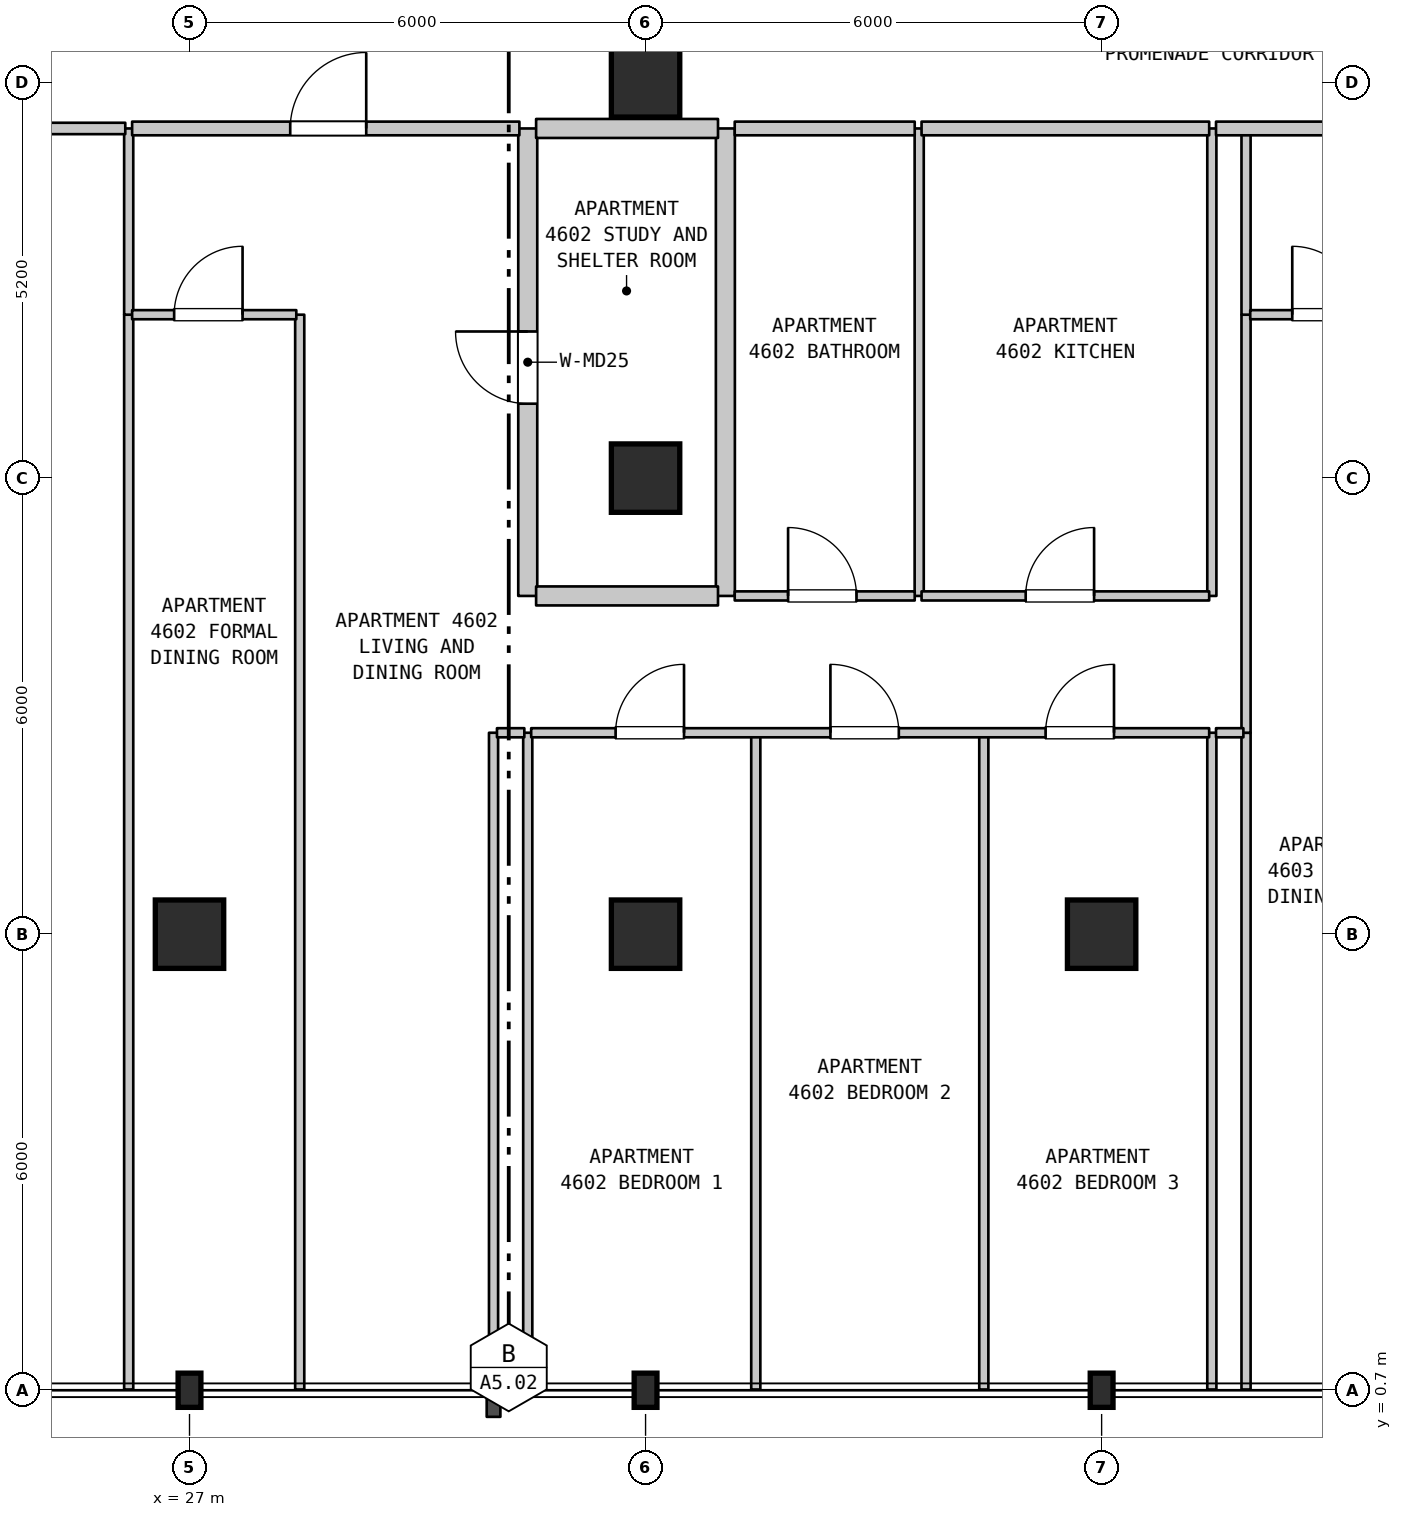
"""IFC4 building model, lengths in metres.
Left out: names, types, materials, properties, quantities, classifications, styles, units other than length and angle.
Written with IfcOpenShell. Run it as: python <this file> out.ifc"""

import sys

from ifc_helpers import new_model, si_unit, direction, frame, frame_2d, origin, origin_2d, place, context, subcontext, project, spatial, rectangle, i_section, extrude, element, fill, save


model = new_model("IFC4")
c1 = context("Model", 3, precision=1e-05, world=origin(), true_north=direction((0.0, 1.0)))
c2 = subcontext(c1, "Body", "Model", "MODEL_VIEW")
j1 = project(units=[si_unit("LENGTHUNIT", "METRE"), si_unit("PLANEANGLEUNIT", "RADIAN")], contexts=[c1])
p1 = place(None, origin())
s1 = spatial("IfcSite", under=j1, at=p1, CompositionType="ELEMENT")
p2 = place(p1, origin())
s2 = spatial("IfcBuilding", under=s1, at=p2, CompositionType="ELEMENT")
p3 = place(p2, frame((0.0, 0.0, 188.4)))
s3 = spatial("IfcBuildingStorey", under=s2, at=p3, CompositionType="ELEMENT", Elevation=188.4)
p4 = place(p3, frame((27.0, 0.7, 0.0), z_axis=(0.0, 0.0, 1.0), x_axis=(1.0, 0.0, 0.0)))
e1 = element("IfcColumn", 1, at=p4, inside=s3, PredefinedType="COLUMN", context=c2, shape_type="SweptSolid", body=[
    extrude(i_section(OverallWidth=0.3, OverallDepth=0.45, WebThickness=0.014, FlangeThickness=0.026, FilletRadius=0.027, at=origin_2d()), origin(), (0.0, 0.0, 1.0), 3.7),
])
p5 = place(p3, frame((27.0, 6.7, 0.0), z_axis=(0.0, 0.0, 1.0), x_axis=(1.0, 0.0, 0.0)))
e2 = element("IfcColumn", 2, at=p5, inside=s3, PredefinedType="COLUMN", context=c2, shape_type="SweptSolid", body=[
    extrude(rectangle(XDim=0.9, YDim=0.9, at=origin_2d()), origin(), (0.0, 0.0, 1.0), 3.7),
])
p6 = place(p3, frame((33.0, 0.7, 0.0), z_axis=(0.0, 0.0, 1.0), x_axis=(1.0, 0.0, 0.0)))
e3 = element("IfcColumn", 3, at=p6, inside=s3, PredefinedType="COLUMN", context=c2, shape_type="SweptSolid", body=[
    extrude(i_section(OverallWidth=0.3, OverallDepth=0.45, WebThickness=0.014, FlangeThickness=0.026, FilletRadius=0.027, at=origin_2d()), origin(), (0.0, 0.0, 1.0), 3.7),
])
for number, where, z_axis, x_axis in (
    (4, (33.0, 6.7, 0.0), (0.0, 0.0, 1.0), (1.0, 0.0, 0.0)),
    (5, (33.0, 12.7, 0.0), (0.0, 0.0, 1.0), (1.0, 0.0, 0.0)),
    (6, (33.0, 17.9, 0.0), (0.0, 0.0, 1.0), (1.0, 0.0, 0.0)),
):
    element("IfcColumn", number, at=place(p3, frame(where, z_axis=z_axis, x_axis=x_axis)), inside=s3, PredefinedType="COLUMN", context=c2, shape_type="SweptSolid", body=[
        extrude(rectangle(XDim=0.9, YDim=0.9, at=origin_2d()), origin(), (0.0, 0.0, 1.0), 3.7),
    ])
p7 = place(p3, frame((39.0, 0.7, 0.0), z_axis=(0.0, 0.0, 1.0), x_axis=(1.0, 0.0, 0.0)))
e7 = element("IfcColumn", 7, at=p7, inside=s3, PredefinedType="COLUMN", context=c2, shape_type="SweptSolid", body=[
    extrude(i_section(OverallWidth=0.3, OverallDepth=0.45, WebThickness=0.014, FlangeThickness=0.026, FilletRadius=0.027, at=origin_2d()), origin(), (0.0, 0.0, 1.0), 3.7),
])
p8 = place(p3, frame((39.0, 6.7, 0.0), z_axis=(0.0, 0.0, 1.0), x_axis=(1.0, 0.0, 0.0)))
e8 = element("IfcColumn", 8, at=p8, inside=s3, PredefinedType="COLUMN", context=c2, shape_type="SweptSolid", body=[
    extrude(rectangle(XDim=0.9, YDim=0.9, at=origin_2d()), origin(), (0.0, 0.0, 1.0), 3.7),
])
p9 = place(p3, frame((26.2, 0.71, 0.0), z_axis=(0.0, 0.0, 1.0), x_axis=(0.0, 1.0, 0.0)))
e9 = element("IfcWall", 9, at=p9, inside=s3, PredefinedType="PARTITIONING", context=c2, shape_type="SweptSolid", body=[
    extrude(rectangle(XDim=14.14, YDim=0.12, at=frame_2d((7.07, 0.0))), origin(), (0.0, 0.0, 1.0), 3.39),
])
p10 = place(p3, frame((26.2, 14.85, 0.0), z_axis=(0.0, 0.0, 1.0), x_axis=(0.0, 1.0, 0.0)))
e10 = element("IfcWall", 10, at=p10, inside=s3, PredefinedType="PARTITIONING", context=c2, shape_type="SweptSolid", body=[
    extrude(rectangle(XDim=2.45, YDim=0.12, at=frame_2d((1.225, 0.0))), origin(), (0.0, 0.0, 1.0), 3.39),
])
p11 = place(p3, frame((28.45, 0.71, 0.0), z_axis=(0.0, 0.0, 1.0), x_axis=(0.0, 1.0, 0.0)))
e11 = element("IfcWall", 11, at=p11, inside=s3, PredefinedType="PARTITIONING", context=c2, shape_type="SweptSolid", body=[
    extrude(rectangle(XDim=14.14, YDim=0.12, at=frame_2d((7.07, 0.0))), origin(), (0.0, 0.0, 1.0), 3.39),
])
for number, where, z_axis, x_axis in (
    (12, (31.0, 0.71, 0.0), (0.0, 0.0, 1.0), (0.0, 1.0, 0.0)),
    (13, (31.45, 0.71, 0.0), (0.0, 0.0, 1.0), (0.0, 1.0, 0.0)),
):
    element("IfcWall", number, at=place(p3, frame(where, z_axis=z_axis, x_axis=x_axis)), inside=s3, PredefinedType="PARTITIONING", context=c2, shape_type="SweptSolid", body=[
        extrude(rectangle(XDim=8.64, YDim=0.12, at=frame_2d((4.32, 0.0))), origin(), (0.0, 0.0, 1.0), 3.39),
    ])
p12 = place(p3, frame((31.45, 11.15, 0.0), z_axis=(0.0, 0.0, 1.0), x_axis=(0.0, 1.0, 0.0)))
e14 = element("IfcWall", 14, at=p12, inside=s3, PredefinedType="STANDARD", context=c2, shape_type="SweptSolid", body=[
    extrude(rectangle(XDim=6.15, YDim=0.25, at=frame_2d((3.075, 0.0))), origin(), (0.0, 0.0, 1.0), 3.39),
])
p13 = place(p12, frame((2.529, 0.0, 0.0)))
e15 = element("IfcOpeningElement", 15, at=p13, cuts=e14, PredefinedType="OPENING", context=c2, shape_type="SweptSolid", body=[
    extrude(rectangle(XDim=0.95, YDim=2.15, at=frame_2d((0.475, 1.075))), frame((0.0, 0.135, 0.0), z_axis=(0.0, -1.0, 0.0), x_axis=(1.0, 0.0, 0.0)), (0.0, 0.0, 1.0), 0.27),
])
p14 = place(p3, frame((34.05, 11.15, 0.0), z_axis=(0.0, 0.0, 1.0), x_axis=(0.0, 1.0, 0.0)))
e16 = element("IfcWall", 16, at=p14, inside=s3, PredefinedType="STANDARD", context=c2, shape_type="SweptSolid", body=[
    extrude(rectangle(XDim=6.15, YDim=0.25, at=frame_2d((3.075, 0.0))), origin(), (0.0, 0.0, 1.0), 3.39),
])
p15 = place(p3, frame((34.45, 0.71, 0.0), z_axis=(0.0, 0.0, 1.0), x_axis=(0.0, 1.0, 0.0)))
e17 = element("IfcWall", 17, at=p15, inside=s3, PredefinedType="PARTITIONING", context=c2, shape_type="SweptSolid", body=[
    extrude(rectangle(XDim=8.64, YDim=0.12, at=frame_2d((4.32, 0.0))), origin(), (0.0, 0.0, 1.0), 3.39),
])
p16 = place(p3, frame((36.6, 11.15, 0.0), z_axis=(0.0, 0.0, 1.0), x_axis=(0.0, 1.0, 0.0)))
e18 = element("IfcWall", 18, at=p16, inside=s3, PredefinedType="PARTITIONING", context=c2, shape_type="SweptSolid", body=[
    extrude(rectangle(XDim=6.15, YDim=0.12, at=frame_2d((3.075, 0.0))), origin(), (0.0, 0.0, 1.0), 3.39),
])
for number, where, z_axis, x_axis in (
    (19, (37.45, 0.71, 0.0), (0.0, 0.0, 1.0), (0.0, 1.0, 0.0)),
    (20, (40.45, 0.71, 0.0), (0.0, 0.0, 1.0), (0.0, 1.0, 0.0)),
):
    element("IfcWall", number, at=place(p3, frame(where, z_axis=z_axis, x_axis=x_axis)), inside=s3, PredefinedType="PARTITIONING", context=c2, shape_type="SweptSolid", body=[
        extrude(rectangle(XDim=8.64, YDim=0.12, at=frame_2d((4.32, 0.0))), origin(), (0.0, 0.0, 1.0), 3.39),
    ])
p17 = place(p3, frame((40.45, 11.15, 0.0), z_axis=(0.0, 0.0, 1.0), x_axis=(0.0, 1.0, 0.0)))
e21 = element("IfcWall", 21, at=p17, inside=s3, PredefinedType="PARTITIONING", context=c2, shape_type="SweptSolid", body=[
    extrude(rectangle(XDim=6.15, YDim=0.12, at=frame_2d((3.075, 0.0))), origin(), (0.0, 0.0, 1.0), 3.39),
])
p18 = place(p3, frame((40.9, 0.71, 0.0), z_axis=(0.0, 0.0, 1.0), x_axis=(0.0, 1.0, 0.0)))
e22 = element("IfcWall", 22, at=p18, inside=s3, PredefinedType="PARTITIONING", context=c2, shape_type="SweptSolid", body=[
    extrude(rectangle(XDim=8.64, YDim=0.12, at=frame_2d((4.32, 0.0))), origin(), (0.0, 0.0, 1.0), 3.39),
])
p19 = place(p3, frame((40.9, 9.35, 0.0), z_axis=(0.0, 0.0, 1.0), x_axis=(0.0, 1.0, 0.0)))
e23 = element("IfcWall", 23, at=p19, inside=s3, PredefinedType="PARTITIONING", context=c2, shape_type="SweptSolid", body=[
    extrude(rectangle(XDim=5.5, YDim=0.12, at=frame_2d((2.75, 0.0))), origin(), (0.0, 0.0, 1.0), 3.39),
])
p20 = place(p3, frame((40.9, 14.85, 0.0), z_axis=(0.0, 0.0, 1.0), x_axis=(0.0, 1.0, 0.0)))
e24 = element("IfcWall", 24, at=p20, inside=s3, PredefinedType="PARTITIONING", context=c2, shape_type="SweptSolid", body=[
    extrude(rectangle(XDim=2.45, YDim=0.12, at=frame_2d((1.225, 0.0))), origin(), (0.0, 0.0, 1.0), 3.39),
])
p21 = place(p3, frame((31.045, 9.35, 0.0), z_axis=(0.0, 0.0, 1.0), x_axis=(1.0, 0.0, 0.0)))
e25 = element("IfcWall", 25, at=p21, inside=s3, PredefinedType="PARTITIONING", context=c2, shape_type="SweptSolid", body=[
    extrude(rectangle(XDim=0.36, YDim=0.12, at=frame_2d((0.18, 0.0))), origin(), (0.0, 0.0, 1.0), 3.39),
])
p22 = place(p3, frame((31.495, 9.35, 0.0), z_axis=(0.0, 0.0, 1.0), x_axis=(1.0, 0.0, 0.0)))
e26 = element("IfcWall", 26, at=p22, inside=s3, PredefinedType="PARTITIONING", context=c2, shape_type="SweptSolid", body=[
    extrude(rectangle(XDim=8.92, YDim=0.12, at=frame_2d((4.46, 0.0))), origin(), (0.0, 0.0, 1.0), 3.39),
])
p23 = place(p22, frame((1.111, 0.0, 0.0)))
e27 = element("IfcOpeningElement", 27, at=p23, cuts=e26, PredefinedType="OPENING", context=c2, shape_type="SweptSolid", body=[
    extrude(rectangle(XDim=0.9, YDim=2.15, at=frame_2d((0.45, 1.075))), frame((0.0, 0.07, 0.0), z_axis=(0.0, -1.0, 0.0), x_axis=(1.0, 0.0, 0.0)), (0.0, 0.0, 1.0), 0.14),
])
p24 = place(p22, frame((3.937, 0.0, 0.0)))
e28 = element("IfcOpeningElement", 28, at=p24, cuts=e26, PredefinedType="OPENING", context=c2, shape_type="SweptSolid", body=[
    extrude(rectangle(XDim=0.9, YDim=2.15, at=frame_2d((0.45, 1.075))), frame((0.0, 0.07, 0.0), z_axis=(0.0, -1.0, 0.0), x_axis=(1.0, 0.0, 0.0)), (0.0, 0.0, 1.0), 0.14),
])
p25 = place(p22, frame((6.768, 0.0, 0.0)))
e29 = element("IfcOpeningElement", 29, at=p25, cuts=e26, PredefinedType="OPENING", context=c2, shape_type="SweptSolid", body=[
    extrude(rectangle(XDim=0.9, YDim=2.15, at=frame_2d((0.45, 1.075))), frame((0.0, 0.07, 0.0), z_axis=(0.0, -1.0, 0.0), x_axis=(1.0, 0.0, 0.0)), (0.0, 0.0, 1.0), 0.14),
])
p26 = place(p3, frame((40.505, 9.35, 0.0), z_axis=(0.0, 0.0, 1.0), x_axis=(1.0, 0.0, 0.0)))
e30 = element("IfcWall", 30, at=p26, inside=s3, PredefinedType="PARTITIONING", context=c2, shape_type="SweptSolid", body=[
    extrude(rectangle(XDim=0.36, YDim=0.12, at=frame_2d((0.18, 0.0))), origin(), (0.0, 0.0, 1.0), 3.39),
])
p27 = place(p3, frame((31.56, 11.15, 0.0), z_axis=(0.0, 0.0, 1.0), x_axis=(1.0, 0.0, 0.0)))
e31 = element("IfcWall", 31, at=p27, inside=s3, PredefinedType="STANDARD", context=c2, shape_type="SweptSolid", body=[
    extrude(rectangle(XDim=2.393, YDim=0.25, at=frame_2d((1.196, 0.0))), origin(), (0.0, 0.0, 1.0), 3.39),
])
p28 = place(p3, frame((34.173, 11.15, 0.0), z_axis=(0.0, 0.0, 1.0), x_axis=(1.0, 0.0, 0.0)))
e32 = element("IfcWall", 32, at=p28, inside=s3, PredefinedType="PARTITIONING", context=c2, shape_type="SweptSolid", body=[
    extrude(rectangle(XDim=2.368, YDim=0.12, at=frame_2d((1.184, 0.0))), origin(), (0.0, 0.0, 1.0), 3.39),
])
p29 = place(p28, frame((0.702, 0.0, 0.0)))
e33 = element("IfcOpeningElement", 33, at=p29, cuts=e32, PredefinedType="OPENING", context=c2, shape_type="SweptSolid", body=[
    extrude(rectangle(XDim=0.9, YDim=2.1, at=frame_2d((0.45, 1.05))), frame((0.0, 0.07, 0.0), z_axis=(0.0, -1.0, 0.0), x_axis=(1.0, 0.0, 0.0)), (0.0, 0.0, 1.0), 0.14),
])
p30 = place(p3, frame((36.631, 11.15, 0.0), z_axis=(0.0, 0.0, 1.0), x_axis=(1.0, 0.0, 0.0)))
e34 = element("IfcWall", 34, at=p30, inside=s3, PredefinedType="PARTITIONING", context=c2, shape_type="SweptSolid", body=[
    extrude(rectangle(XDim=3.784, YDim=0.12, at=frame_2d((1.892, 0.0))), origin(), (0.0, 0.0, 1.0), 3.39),
])
p31 = place(p30, frame((1.37, 0.0, 0.0)))
e35 = element("IfcOpeningElement", 35, at=p31, cuts=e34, PredefinedType="OPENING", context=c2, shape_type="SweptSolid", body=[
    extrude(rectangle(XDim=0.9, YDim=2.15, at=frame_2d((0.45, 1.075))), frame((0.0, 0.07, 0.0), z_axis=(0.0, -1.0, 0.0), x_axis=(1.0, 0.0, 0.0)), (0.0, 0.0, 1.0), 0.14),
])
p32 = place(p3, frame((26.245, 14.85, 0.0), z_axis=(0.0, 0.0, 1.0), x_axis=(1.0, 0.0, 0.0)))
e36 = element("IfcWall", 36, at=p32, inside=s3, PredefinedType="PARTITIONING", context=c2, shape_type="SweptSolid", body=[
    extrude(rectangle(XDim=2.16, YDim=0.12, at=frame_2d((1.08, 0.0))), origin(), (0.0, 0.0, 1.0), 3.39),
])
p33 = place(p32, frame((0.553, 0.0, 0.0)))
e37 = element("IfcOpeningElement", 37, at=p33, cuts=e36, PredefinedType="OPENING", context=c2, shape_type="SweptSolid", body=[
    extrude(rectangle(XDim=0.9, YDim=2.15, at=frame_2d((0.45, 1.075))), frame((0.0, 0.07, 0.0), z_axis=(0.0, -1.0, 0.0), x_axis=(1.0, 0.0, 0.0)), (0.0, 0.0, 1.0), 0.14),
])
p34 = place(p3, frame((40.955, 14.85, 0.0), z_axis=(0.0, 0.0, 1.0), x_axis=(1.0, 0.0, 0.0)))
e38 = element("IfcWall", 38, at=p34, inside=s3, PredefinedType="PARTITIONING", context=c2, shape_type="SweptSolid", body=[
    extrude(rectangle(XDim=2.16, YDim=0.12, at=frame_2d((1.08, 0.0))), origin(), (0.0, 0.0, 1.0), 3.39),
])
p35 = place(p34, frame((0.553, 0.0, 0.0)))
e39 = element("IfcOpeningElement", 39, at=p35, cuts=e38, PredefinedType="OPENING", context=c2, shape_type="SweptSolid", body=[
    extrude(rectangle(XDim=0.9, YDim=2.15, at=frame_2d((0.45, 1.075))), frame((0.0, 0.07, 0.0), z_axis=(0.0, -1.0, 0.0), x_axis=(1.0, 0.0, 0.0)), (0.0, 0.0, 1.0), 0.14),
])
p36 = place(p3, frame((21.245, 17.3, 0.0), z_axis=(0.0, 0.0, 1.0), x_axis=(1.0, 0.0, 0.0)))
e40 = element("IfcWall", 40, at=p36, inside=s3, PredefinedType="STANDARD", context=c2, shape_type="SweptSolid", body=[
    extrude(rectangle(XDim=4.91, YDim=0.15, at=frame_2d((2.455, 0.0))), origin(), (0.0, 0.0, 1.0), 3.39),
])
p37 = place(p36, frame((1.884, 0.0, 0.0)))
e41 = element("IfcOpeningElement", 41, at=p37, cuts=e40, PredefinedType="OPENING", context=c2, shape_type="SweptSolid", body=[
    extrude(rectangle(XDim=1.0, YDim=2.15, at=frame_2d((0.5, 1.075))), frame((0.0, 0.085, 0.0), z_axis=(0.0, -1.0, 0.0), x_axis=(1.0, 0.0, 0.0)), (0.0, 0.0, 1.0), 0.17),
])
p38 = place(p3, frame((26.245, 17.3, 0.0), z_axis=(0.0, 0.0, 1.0), x_axis=(1.0, 0.0, 0.0)))
e42 = element("IfcWall", 42, at=p38, inside=s3, PredefinedType="STANDARD", context=c2, shape_type="SweptSolid", body=[
    extrude(rectangle(XDim=5.095, YDim=0.18, at=frame_2d((2.547, 0.0))), origin(), (0.0, 0.0, 1.0), 3.39),
])
p39 = place(p38, frame((2.08, 0.0, 0.0)))
e43 = element("IfcOpeningElement", 43, at=p39, cuts=e42, PredefinedType="OPENING", context=c2, shape_type="SweptSolid", body=[
    extrude(rectangle(XDim=1.0, YDim=2.15, at=frame_2d((0.5, 1.075))), frame((0.0, 0.1, 0.0), z_axis=(0.0, -1.0, 0.0), x_axis=(1.0, 0.0, 0.0)), (0.0, 0.0, 1.0), 0.2),
])
p40 = place(p3, frame((31.56, 17.3, 0.0), z_axis=(0.0, 0.0, 1.0), x_axis=(1.0, 0.0, 0.0)))
e44 = element("IfcWall", 44, at=p40, inside=s3, PredefinedType="STANDARD", context=c2, shape_type="SweptSolid", body=[
    extrude(rectangle(XDim=2.393, YDim=0.25, at=frame_2d((1.196, 0.0))), origin(), (0.0, 0.0, 1.0), 3.39),
])
p41 = place(p3, frame((34.173, 17.3, 0.0), z_axis=(0.0, 0.0, 1.0), x_axis=(1.0, 0.0, 0.0)))
e45 = element("IfcWall", 45, at=p41, inside=s3, PredefinedType="STANDARD", context=c2, shape_type="SweptSolid", body=[
    extrude(rectangle(XDim=2.368, YDim=0.18, at=frame_2d((1.184, 0.0))), origin(), (0.0, 0.0, 1.0), 3.39),
])
p42 = place(p3, frame((36.631, 17.3, 0.0), z_axis=(0.0, 0.0, 1.0), x_axis=(1.0, 0.0, 0.0)))
e46 = element("IfcWall", 46, at=p42, inside=s3, PredefinedType="STANDARD", context=c2, shape_type="SweptSolid", body=[
    extrude(rectangle(XDim=3.784, YDim=0.18, at=frame_2d((1.892, 0.0))), origin(), (0.0, 0.0, 1.0), 3.39),
])
p43 = place(p3, frame((40.505, 17.3, 0.0), z_axis=(0.0, 0.0, 1.0), x_axis=(1.0, 0.0, 0.0)))
e47 = element("IfcWall", 47, at=p43, inside=s3, PredefinedType="STANDARD", context=c2, shape_type="SweptSolid", body=[
    extrude(rectangle(XDim=5.545, YDim=0.18, at=frame_2d((2.772, 0.0))), origin(), (0.0, 0.0, 1.0), 3.39),
])
p44 = place(p43, frame((2.305, 0.0, 0.0)))
e48 = element("IfcOpeningElement", 48, at=p44, cuts=e47, PredefinedType="OPENING", context=c2, shape_type="SweptSolid", body=[
    extrude(rectangle(XDim=1.0, YDim=2.15, at=frame_2d((0.5, 1.075))), frame((0.0, 0.1, 0.0), z_axis=(0.0, -1.0, 0.0), x_axis=(1.0, 0.0, 0.0)), (0.0, 0.0, 1.0), 0.2),
])
p45 = place(p13, origin())
e49 = element("IfcDoor", 49, at=p45, inside=s3, OperationType="SINGLE_SWING_RIGHT", PredefinedType="DOOR", context=c2, shape_type="SweptSolid", body=[
    extrude(rectangle(XDim=0.95, YDim=2.15, at=frame_2d((0.475, 1.075))), frame((0.0, 0.025, 0.0), z_axis=(0.0, -1.0, 0.0), x_axis=(1.0, 0.0, 0.0)), (0.0, 0.0, 1.0), 0.05),
])
fill(e15, e49)
p46 = place(p23, origin())
e50 = element("IfcDoor", 50, at=p46, inside=s3, OperationType="SINGLE_SWING_RIGHT", PredefinedType="DOOR", context=c2, shape_type="SweptSolid", body=[
    extrude(rectangle(XDim=0.9, YDim=2.15, at=frame_2d((0.45, 1.075))), frame((0.0, 0.025, 0.0), z_axis=(0.0, -1.0, 0.0), x_axis=(1.0, 0.0, 0.0)), (0.0, 0.0, 1.0), 0.05),
])
fill(e27, e50)
p47 = place(p24, origin())
e51 = element("IfcDoor", 51, at=p47, inside=s3, OperationType="SINGLE_SWING_LEFT", PredefinedType="DOOR", context=c2, shape_type="SweptSolid", body=[
    extrude(rectangle(XDim=0.9, YDim=2.15, at=frame_2d((0.45, 1.075))), frame((0.0, 0.025, 0.0), z_axis=(0.0, -1.0, 0.0), x_axis=(1.0, 0.0, 0.0)), (0.0, 0.0, 1.0), 0.05),
])
fill(e28, e51)
p48 = place(p25, origin())
e52 = element("IfcDoor", 52, at=p48, inside=s3, OperationType="SINGLE_SWING_RIGHT", PredefinedType="DOOR", context=c2, shape_type="SweptSolid", body=[
    extrude(rectangle(XDim=0.9, YDim=2.15, at=frame_2d((0.45, 1.075))), frame((0.0, 0.025, 0.0), z_axis=(0.0, -1.0, 0.0), x_axis=(1.0, 0.0, 0.0)), (0.0, 0.0, 1.0), 0.05),
])
fill(e29, e52)
p49 = place(p29, origin())
e53 = element("IfcDoor", 53, at=p49, inside=s3, OperationType="SINGLE_SWING_LEFT", PredefinedType="DOOR", context=c2, shape_type="SweptSolid", body=[
    extrude(rectangle(XDim=0.9, YDim=2.1, at=frame_2d((0.45, 1.05))), frame((0.0, 0.025, 0.0), z_axis=(0.0, -1.0, 0.0), x_axis=(1.0, 0.0, 0.0)), (0.0, 0.0, 1.0), 0.05),
])
fill(e33, e53)
p50 = place(p31, origin())
e54 = element("IfcDoor", 54, at=p50, inside=s3, OperationType="SINGLE_SWING_RIGHT", PredefinedType="DOOR", context=c2, shape_type="SweptSolid", body=[
    extrude(rectangle(XDim=0.9, YDim=2.15, at=frame_2d((0.45, 1.075))), frame((0.0, 0.025, 0.0), z_axis=(0.0, -1.0, 0.0), x_axis=(1.0, 0.0, 0.0)), (0.0, 0.0, 1.0), 0.05),
])
fill(e35, e54)
p51 = place(p33, origin())
e55 = element("IfcDoor", 55, at=p51, inside=s3, OperationType="SINGLE_SWING_RIGHT", PredefinedType="DOOR", context=c2, shape_type="SweptSolid", body=[
    extrude(rectangle(XDim=0.9, YDim=2.15, at=frame_2d((0.45, 1.075))), frame((0.0, 0.025, 0.0), z_axis=(0.0, -1.0, 0.0), x_axis=(1.0, 0.0, 0.0)), (0.0, 0.0, 1.0), 0.05),
])
fill(e37, e55)
p52 = place(p35, origin())
e56 = element("IfcDoor", 56, at=p52, inside=s3, OperationType="SINGLE_SWING_LEFT", PredefinedType="DOOR", context=c2, shape_type="SweptSolid", body=[
    extrude(rectangle(XDim=0.9, YDim=2.15, at=frame_2d((0.45, 1.075))), frame((0.0, 0.025, 0.0), z_axis=(0.0, -1.0, 0.0), x_axis=(1.0, 0.0, 0.0)), (0.0, 0.0, 1.0), 0.05),
])
fill(e39, e56)
p53 = place(p39, origin())
e57 = element("IfcDoor", 57, at=p53, inside=s3, OperationType="SINGLE_SWING_RIGHT", PredefinedType="DOOR", context=c2, shape_type="SweptSolid", body=[
    extrude(rectangle(XDim=1.0, YDim=2.15, at=frame_2d((0.5, 1.075))), frame((0.0, 0.025, 0.0), z_axis=(0.0, -1.0, 0.0), x_axis=(1.0, 0.0, 0.0)), (0.0, 0.0, 1.0), 0.05),
])
fill(e43, e57)
save(model, sys.argv[1])
